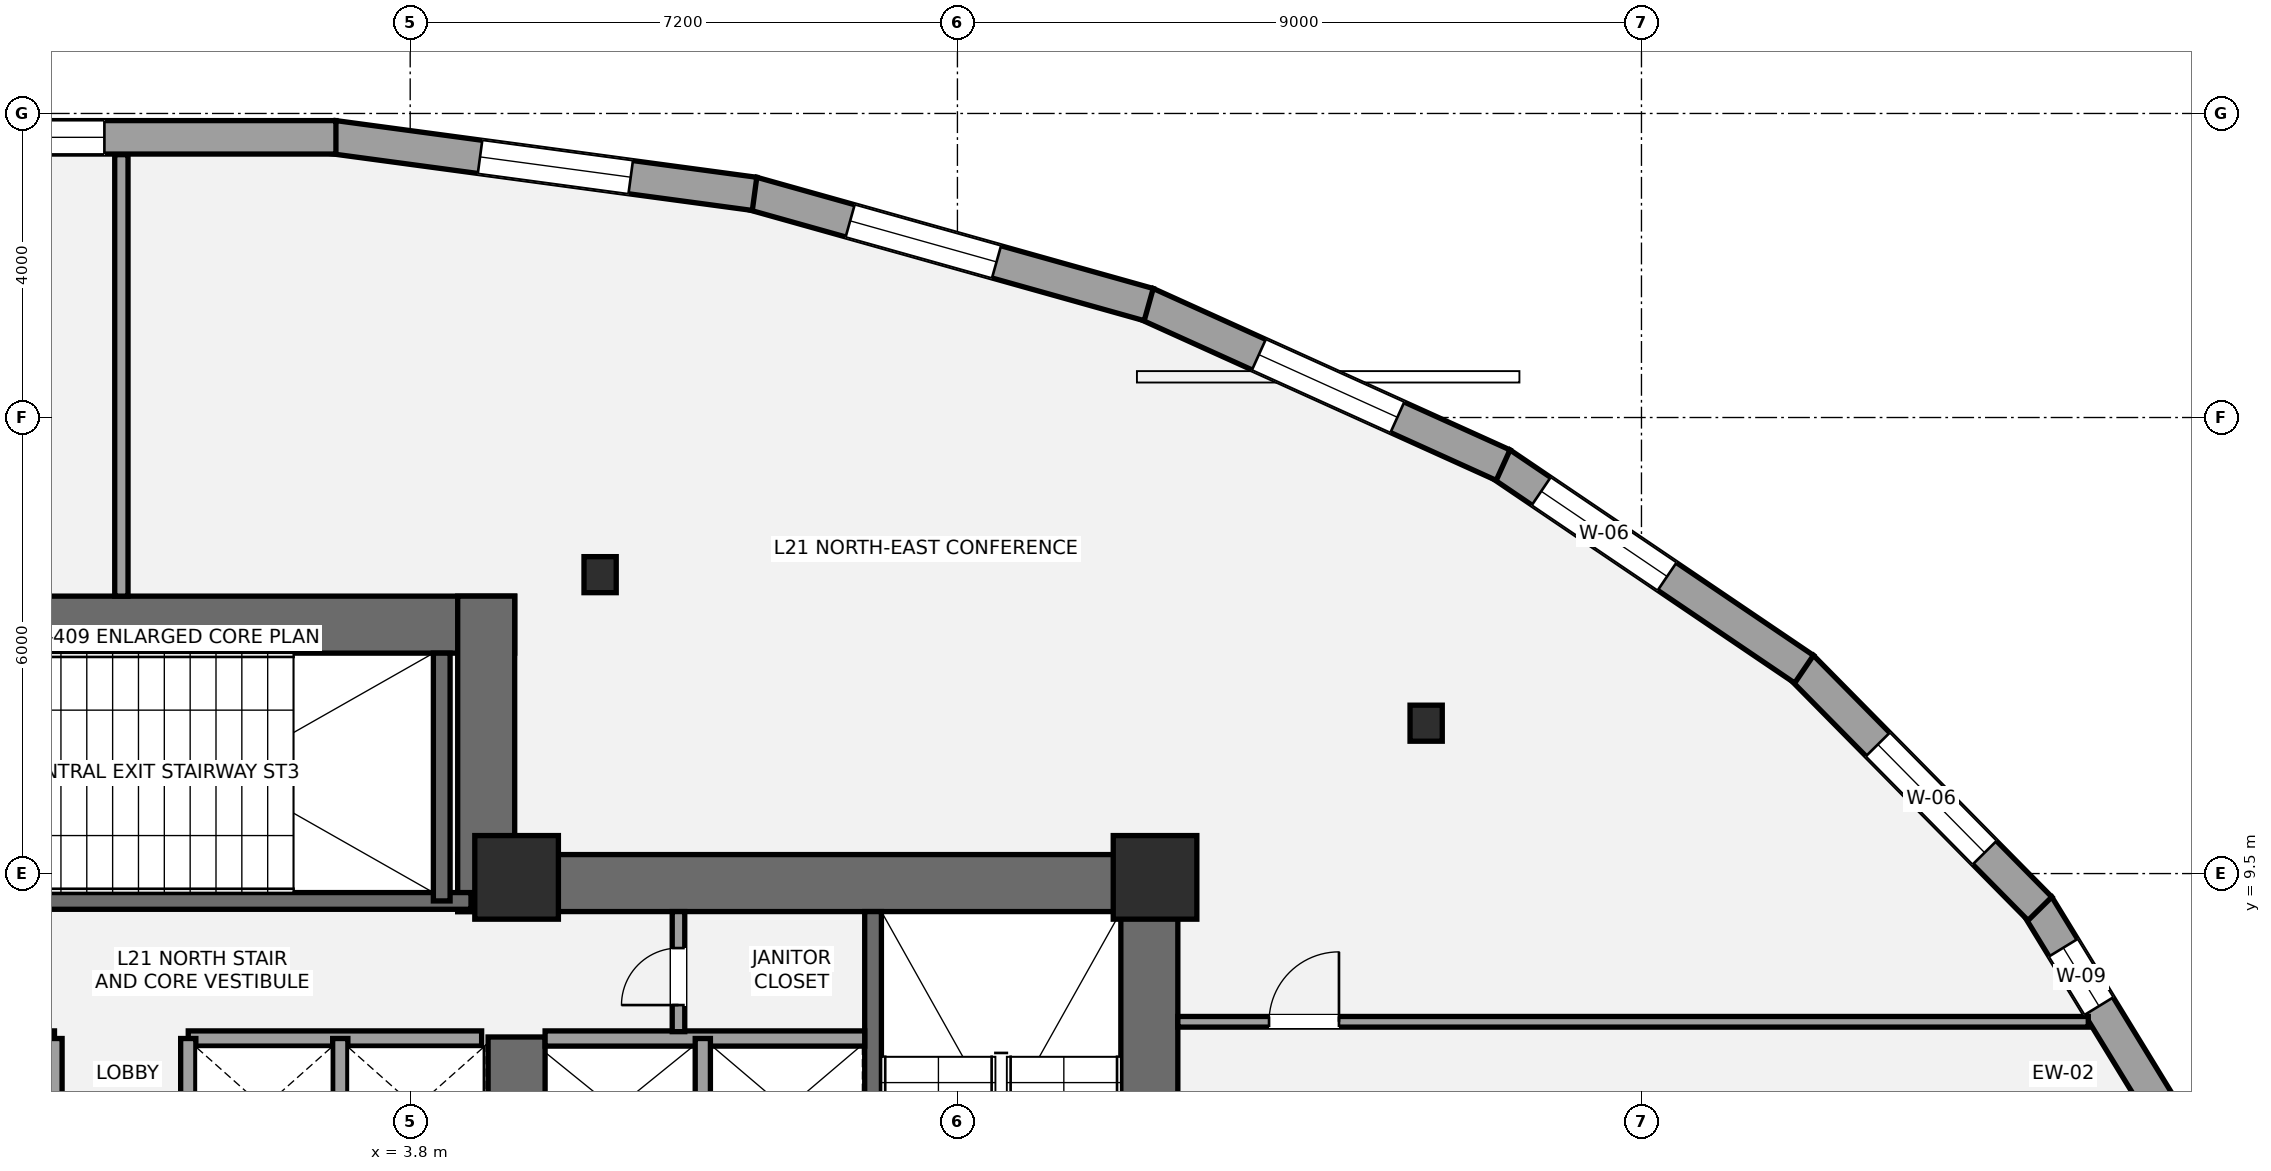
"""IFC4 building model, lengths in metres.
Left out: names, types, materials, properties, quantities, classifications, styles, units other than length and angle.
Written with IfcOpenShell. Run it as: python <this file> out.ifc"""

import sys

from ifc_helpers import new_model, si_unit, direction, frame, frame_2d, origin, origin_2d, place, context, subcontext, project, spatial, rectangle, i_section, extrude, element, fill, save


model = new_model("IFC4")
c1 = context("Model", 3, precision=1e-05, world=origin(), true_north=direction((0.0, 1.0)))
c2 = subcontext(c1, "Body", "Model", "MODEL_VIEW")
j1 = project(units=[si_unit("LENGTHUNIT", "METRE"), si_unit("PLANEANGLEUNIT", "RADIAN")], contexts=[c1])
p1 = place(None, origin())
s1 = spatial("IfcSite", under=j1, at=p1, CompositionType="ELEMENT")
p2 = place(p1, origin())
s2 = spatial("IfcBuilding", under=s1, at=p2, CompositionType="ELEMENT")
p3 = place(p2, frame((0.0, 0.0, 81.9)))
s3 = spatial("IfcBuildingStorey", under=s2, at=p3, CompositionType="ELEMENT", Elevation=81.9)
p4 = place(p3, frame((13.525, 1.1, 0.0), z_axis=(0.0, 0.0, 1.0), x_axis=(0.0, 1.0, 0.0)))
e1 = element("IfcWall", 1, at=p4, inside=s3, PredefinedType="SHEAR", context=c2, shape_type="SweptSolid", body=[
    extrude(rectangle(XDim=8.65, YDim=0.75, at=frame_2d((4.325, 0.0))), origin(), (0.0, 0.0, 1.0), 4.2),
])
p5 = place(p3, frame((4.425, 9.375, 0.0), z_axis=(0.0, 0.0, 1.0), x_axis=(1.0, 0.0, 0.0)))
e2 = element("IfcWall", 2, at=p5, inside=s3, PredefinedType="SHEAR", context=c2, shape_type="SweptSolid", body=[
    extrude(rectangle(XDim=9.475, YDim=0.75, at=frame_2d((4.737, 0.0))), origin(), (0.0, 0.0, 1.0), 4.2),
])
p6 = place(p3, frame((5.2, 5.35, 0.0), z_axis=(0.0, 0.0, 1.0), x_axis=(0.0, 1.0, 0.0)))
e3 = element("IfcWall", 3, at=p6, inside=s3, PredefinedType="SHEAR", context=c2, shape_type="SweptSolid", body=[
    extrude(rectangle(XDim=2.0, YDim=0.75, at=frame_2d((1.0, 0.0))), origin(), (0.0, 0.0, 1.0), 4.2),
])
p7 = place(p3, frame((9.89, 1.85, 0.0), z_axis=(0.0, 0.0, 1.0), x_axis=(0.0, 1.0, 0.0)))
e4 = element("IfcWall", 4, at=p7, inside=s3, PredefinedType="SHEAR", context=c2, shape_type="SweptSolid", body=[
    extrude(rectangle(XDim=7.15, YDim=0.22, at=frame_2d((3.575, 0.0))), origin(), (0.0, 0.0, 1.0), 4.2),
])
p8 = place(p3, frame((-5.175, 12.775, 0.0), z_axis=(0.0, 0.0, 1.0), x_axis=(1.0, 0.0, 0.0)))
e5 = element("IfcWall", 5, at=p8, inside=s3, PredefinedType="SHEAR", context=c2, shape_type="SweptSolid", body=[
    extrude(rectangle(XDim=10.35, YDim=0.75, at=frame_2d((5.175, 0.0))), origin(), (0.0, 0.0, 1.0), 4.2),
])
p9 = place(p3, frame((4.8, 9.0, 0.0), z_axis=(0.0, 0.0, 1.0), x_axis=(0.0, 1.0, 0.0)))
e6 = element("IfcWall", 6, at=p9, inside=s3, PredefinedType="SHEAR", context=c2, shape_type="SweptSolid", body=[
    extrude(rectangle(XDim=4.15, YDim=0.75, at=frame_2d((2.075, 0.0))), origin(), (0.0, 0.0, 1.0), 4.2),
])
p10 = place(p3, frame((-4.7, 9.14, 0.0), z_axis=(0.0, 0.0, 1.0), x_axis=(1.0, 0.0, 0.0)))
e7 = element("IfcWall", 7, at=p10, inside=s3, PredefinedType="SHEAR", context=c2, shape_type="SweptSolid", body=[
    extrude(rectangle(XDim=9.3, YDim=0.22, at=frame_2d((4.65, 0.0))), origin(), (0.0, 0.0, 1.0), 4.2),
])
p11 = place(p10, frame((1.15, 0.0, 0.0)))
e8 = element("IfcOpeningElement", 8, at=p11, cuts=e7, PredefinedType="OPENING", context=c2, shape_type="SweptSolid", body=[
    extrude(rectangle(XDim=1.05, YDim=2.15, at=frame_2d((0.525, 1.075))), frame((0.0, 0.12, 0.0), z_axis=(0.0, -1.0, 0.0), x_axis=(1.0, 0.0, 0.0)), (0.0, 0.0, 1.0), 0.24),
])
p12 = place(p3, frame((4.215, 9.14, 0.0), z_axis=(0.0, 0.0, 1.0), x_axis=(0.0, 1.0, 0.0)))
e9 = element("IfcWall", 9, at=p12, inside=s3, PredefinedType="SHEAR", context=c2, shape_type="SweptSolid", body=[
    extrude(rectangle(XDim=3.26, YDim=0.22, at=frame_2d((1.63, 0.0))), origin(), (0.0, 0.0, 1.0), 4.2),
])
for number, where, z_axis, x_axis in (
    (10, (5.2, 9.45, 0.0), (0.0, 0.0, 1.0), (1.0, 0.0, 0.0)),
    (11, (13.6, 9.45, 0.0), (0.0, 0.0, 1.0), (1.0, 0.0, 0.0)),
):
    element("IfcColumn", number, at=place(p3, frame(where, z_axis=z_axis, x_axis=x_axis)), inside=s3, PredefinedType="COLUMN", context=c2, shape_type="SweptSolid", body=[
        extrude(rectangle(XDim=1.1, YDim=1.1, at=origin_2d()), origin(), (0.0, 0.0, 1.0), 4.2),
    ])
for number, where, z_axis, x_axis in (
    (12, (17.167, 11.478, 0.0), (0.0, 0.0, 1.0), (1.0, 0.0, 0.0)),
    (13, (6.299, 13.433, 0.0), (0.0, 0.0, 1.0), (1.0, 0.0, 0.0)),
):
    element("IfcColumn", number, at=place(p3, frame(where, z_axis=z_axis, x_axis=x_axis)), inside=s3, PredefinedType="COLUMN", context=c2, shape_type="SweptSolid", body=[
        extrude(i_section(OverallWidth=0.424, OverallDepth=0.474, WebThickness=0.048, FlangeThickness=0.077, at=origin_2d()), origin(), (0.0, 0.0, 1.0), 4.2),
    ])
p13 = place(p3, frame((25.212, 9.077, 0.0), z_axis=(0.0, 0.0, 1.0), x_axis=(0.521891226532, -0.85301204427, 0.0)))
e14 = element("IfcWall", 14, at=p13, inside=s3, PredefinedType="STANDARD", context=c2, shape_type="SweptSolid", body=[
    extrude(rectangle(XDim=4.14, YDim=0.44, at=frame_2d((2.07, 0.0))), origin(), (0.0, 0.0, 1.0), 3.228),
])
p14 = place(p13, frame((0.648, 0.0, 0.58)))
e15 = element("IfcOpeningElement", 15, at=p14, cuts=e14, PredefinedType="OPENING", context=c2, shape_type="SweptSolid", body=[
    extrude(rectangle(XDim=0.9, YDim=1.35, at=frame_2d((0.45, 0.675))), frame((0.0, 0.23, 0.0), z_axis=(0.0, -1.0, 0.0), x_axis=(1.0, 0.0, 0.0)), (0.0, 0.0, 1.0), 0.46),
])
p15 = place(p3, frame((22.106, 12.216, 0.0), z_axis=(0.0, 0.0, 1.0), x_axis=(0.702361901729, -0.711820032733, 0.0)))
e16 = element("IfcWall", 16, at=p15, inside=s3, PredefinedType="STANDARD", context=c2, shape_type="SweptSolid", body=[
    extrude(rectangle(XDim=4.466, YDim=0.44, at=frame_2d((2.233, 0.0))), origin(), (0.0, 0.0, 1.0), 3.232),
])
p16 = place(p15, frame((1.429, 0.0, 0.6)))
e17 = element("IfcOpeningElement", 17, at=p16, cuts=e16, PredefinedType="OPENING", context=c2, shape_type="SweptSolid", body=[
    extrude(rectangle(XDim=2.0, YDim=2.1, at=frame_2d((1.0, 1.05))), frame((0.0, 0.23, 0.0), z_axis=(0.0, -1.0, 0.0), x_axis=(1.0, 0.0, 0.0)), (0.0, 0.0, 1.0), 0.46),
])
p17 = place(p3, frame((18.147, 14.892, 0.0), z_axis=(0.0, 0.0, 1.0), x_axis=(0.82804003003, -0.560668983151, 0.0)))
e18 = element("IfcWall", 18, at=p17, inside=s3, PredefinedType="STANDARD", context=c2, shape_type="SweptSolid", body=[
    extrude(rectangle(XDim=4.821, YDim=0.44, at=frame_2d((2.411, 0.0))), origin(), (0.0, 0.0, 1.0), 3.232),
])
p18 = place(p17, frame((0.645, 0.0, 0.6)))
e19 = element("IfcOpeningElement", 19, at=p18, cuts=e18, PredefinedType="OPENING", context=c2, shape_type="SweptSolid", body=[
    extrude(rectangle(XDim=2.0, YDim=2.1, at=frame_2d((1.0, 1.05))), frame((0.0, 0.23, 0.0), z_axis=(0.0, -1.0, 0.0), x_axis=(1.0, 0.0, 0.0)), (0.0, 0.0, 1.0), 0.46),
])
p19 = place(p3, frame((13.486, 16.997, 0.0), z_axis=(0.0, 0.0, 1.0), x_axis=(0.911088856004, -0.412210014999, 0.0)))
e20 = element("IfcWall", 20, at=p19, inside=s3, PredefinedType="STANDARD", context=c2, shape_type="SweptSolid", body=[
    extrude(rectangle(XDim=5.152, YDim=0.44, at=frame_2d((2.576, 0.0))), origin(), (0.0, 0.0, 1.0), 3.228),
])
p20 = place(p19, frame((1.625, 0.0, 0.6)))
e21 = element("IfcOpeningElement", 21, at=p20, cuts=e20, PredefinedType="OPENING", context=c2, shape_type="SweptSolid", body=[
    extrude(rectangle(XDim=2.0, YDim=2.1, at=frame_2d((1.0, 1.05))), frame((0.0, 0.23, 0.0), z_axis=(0.0, -1.0, 0.0), x_axis=(1.0, 0.0, 0.0)), (0.0, 0.0, 1.0), 0.46),
])
p21 = place(p3, frame((8.301, 18.448, 0.0), z_axis=(0.0, 0.0, 1.0), x_axis=(0.962849260033, -0.270039446109, 0.0)))
e22 = element("IfcWall", 22, at=p21, inside=s3, PredefinedType="STANDARD", context=c2, shape_type="SweptSolid", body=[
    extrude(rectangle(XDim=5.417, YDim=0.44, at=frame_2d((2.708, 0.0))), origin(), (0.0, 0.0, 1.0), 3.228),
])
p22 = place(p21, frame((1.338, 0.0, 0.6)))
e23 = element("IfcOpeningElement", 23, at=p22, cuts=e22, PredefinedType="OPENING", context=c2, shape_type="SweptSolid", body=[
    extrude(rectangle(XDim=2.0, YDim=2.1, at=frame_2d((1.0, 1.05))), frame((0.0, 0.23, 0.0), z_axis=(0.0, -1.0, 0.0), x_axis=(1.0, 0.0, 0.0)), (0.0, 0.0, 1.0), 0.46),
])
p23 = place(p3, frame((2.793, 19.188, 0.0), z_axis=(0.0, 0.0, 1.0), x_axis=(0.9910561058, -0.133445851026, 0.0)))
e24 = element("IfcWall", 24, at=p23, inside=s3, PredefinedType="STANDARD", context=c2, shape_type="SweptSolid", body=[
    extrude(rectangle(XDim=5.587, YDim=0.44, at=frame_2d((2.794, 0.0))), origin(), (0.0, 0.0, 1.0), 3.228),
])
p24 = place(p23, frame((1.943, 0.0, 0.6)))
e25 = element("IfcOpeningElement", 25, at=p24, cuts=e24, PredefinedType="OPENING", context=c2, shape_type="SweptSolid", body=[
    extrude(rectangle(XDim=2.0, YDim=2.1, at=frame_2d((1.0, 1.05))), frame((0.0, 0.23, 0.0), z_axis=(0.0, -1.0, 0.0), x_axis=(1.0, 0.0, 0.0)), (0.0, 0.0, 1.0), 0.46),
])
p25 = place(p3, frame((-2.823, 19.186, 0.0), z_axis=(0.0, 0.0, 1.0), x_axis=(1.0, 0.0, 0.0)))
e26 = element("IfcWall", 26, at=p25, inside=s3, PredefinedType="STANDARD", context=c2, shape_type="SweptSolid", body=[
    extrude(rectangle(XDim=5.646, YDim=0.44, at=frame_2d((2.823, 0.0))), origin(), (0.0, 0.0, 1.0), 3.232),
])
p26 = place(p25, frame((0.6, 0.0, 0.6)))
e27 = element("IfcOpeningElement", 27, at=p26, cuts=e26, PredefinedType="OPENING", context=c2, shape_type="SweptSolid", body=[
    extrude(rectangle(XDim=2.0, YDim=2.1, at=frame_2d((1.0, 1.05))), frame((0.0, 0.23, 0.0), z_axis=(0.0, -1.0, 0.0), x_axis=(1.0, 0.0, 0.0)), (0.0, 0.0, 1.0), 0.46),
])
p27 = place(p3, frame((5.575, 7.33, 0.0), z_axis=(0.0, 0.0, 1.0), x_axis=(1.0, 0.0, 0.0)))
e28 = element("IfcWall", 28, at=p27, inside=s3, PredefinedType="SOLIDWALL", context=c2, shape_type="SweptSolid", body=[
    extrude(rectangle(XDim=4.205, YDim=0.2, at=frame_2d((2.103, 0.0))), origin(), (0.0, 0.0, 1.0), 4.01),
])
p28 = place(p3, frame((7.65, 5.47, 0.0), z_axis=(0.0, 0.0, 1.0), x_axis=(0.0, 1.0, 0.0)))
e29 = element("IfcWall", 29, at=p28, inside=s3, PredefinedType="SOLIDWALL", context=c2, shape_type="SweptSolid", body=[
    extrude(rectangle(XDim=1.86, YDim=0.2, at=frame_2d((0.93, 0.0))), origin(), (0.0, 0.0, 1.0), 4.01),
])
for number, where, z_axis, x_axis in (
    (30, (-4.74, 7.33, 0.0), (0.0, 0.0, 1.0), (1.0, 0.0, 0.0)),
    (31, (0.88, 7.33, 0.0), (0.0, 0.0, 1.0), (1.0, 0.0, 0.0)),
):
    element("IfcWall", number, at=place(p3, frame(where, z_axis=z_axis, x_axis=x_axis)), inside=s3, PredefinedType="SOLIDWALL", context=c2, shape_type="SweptSolid", body=[
        extrude(rectangle(XDim=3.86, YDim=0.2, at=frame_2d((1.93, 0.0))), origin(), (0.0, 0.0, 1.0), 4.01),
    ])
for number, where, z_axis, x_axis in (
    (32, (2.88, 5.52, 0.0), (0.0, 0.0, 1.0), (0.0, 1.0, 0.0)),
    (33, (-0.88, 5.52, 0.0), (0.0, 0.0, 1.0), (0.0, 1.0, 0.0)),
    (34, (0.88, 5.52, 0.0), (0.0, 0.0, 1.0), (0.0, 1.0, 0.0)),
):
    element("IfcWall", number, at=place(p3, frame(where, z_axis=z_axis, x_axis=x_axis)), inside=s3, PredefinedType="SOLIDWALL", context=c2, shape_type="SweptSolid", body=[
        extrude(rectangle(XDim=1.81, YDim=0.2, at=frame_2d((0.905, 0.0))), origin(), (0.0, 0.0, 1.0), 4.01),
    ])
p29 = place(p3, frame((7.33, 7.42, 0.0), z_axis=(0.0, 0.0, 1.0), x_axis=(0.0, 1.0, 0.0)))
e35 = element("IfcWall", 35, at=p29, inside=s3, PredefinedType="PARTITIONING", context=c2, shape_type="SweptSolid", body=[
    extrude(rectangle(XDim=1.58, YDim=0.165, at=frame_2d((0.79, 0.0))), origin(), (0.0, 0.0, 1.0), 4.01),
])
p30 = place(p29, frame((0.35, 0.0, 0.0)))
e36 = element("IfcOpeningElement", 36, at=p30, cuts=e35, PredefinedType="OPENING", context=c2, shape_type="SweptSolid", body=[
    extrude(rectangle(XDim=0.75, YDim=2.1, at=frame_2d((0.375, 1.05))), frame((0.0, 0.093, 0.0), z_axis=(0.0, -1.0, 0.0), x_axis=(1.0, 0.0, 0.0)), (0.0, 0.0, 1.0), 0.185),
])
p31 = place(p3, frame((13.9, 7.55, 0.0), z_axis=(0.0, 0.0, 1.0), x_axis=(1.0, 0.0, 0.0)))
e37 = element("IfcWall", 37, at=p31, inside=s3, PredefinedType="PARTITIONING", context=c2, shape_type="SweptSolid", body=[
    extrude(rectangle(XDim=11.979, YDim=0.14, at=frame_2d((5.99, 0.0))), origin(), (0.0, 0.0, 1.0), 3.463),
])
p32 = place(p31, frame((1.2, 0.0, 0.0)))
e38 = element("IfcOpeningElement", 38, at=p32, cuts=e37, PredefinedType="OPENING", context=c2, shape_type="SweptSolid", body=[
    extrude(rectangle(XDim=0.92, YDim=2.15, at=frame_2d((0.46, 1.075))), frame((0.0, 0.08, 0.0), z_axis=(0.0, -1.0, 0.0), x_axis=(1.0, 0.0, 0.0)), (0.0, 0.0, 1.0), 0.16),
])
p33 = place(p3, frame((0.0, 13.15, 0.0), z_axis=(0.0, 0.0, 1.0), x_axis=(0.0, 1.0, 0.0)))
e39 = element("IfcWall", 39, at=p33, inside=s3, PredefinedType="PARTITIONING", context=c2, shape_type="SweptSolid", body=[
    extrude(rectangle(XDim=5.808, YDim=0.175, at=frame_2d((2.904, 0.0))), origin(), (0.0, 0.0, 1.0), 3.463),
])
p34 = place(p14, origin())
e40 = element("IfcWindow", 40, at=p34, inside=s3, PartitioningType="SINGLE_PANEL", PredefinedType="WINDOW", context=c2, shape_type="SweptSolid", body=[
    extrude(rectangle(XDim=0.9, YDim=1.35, at=frame_2d((0.45, 0.675))), frame((0.0, -0.01, 0.0), z_axis=(0.0, -1.0, 0.0), x_axis=(1.0, 0.0, 0.0)), (0.0, 0.0, 1.0), 0.06),
])
fill(e15, e40)
p35 = place(p16, origin())
e41 = element("IfcWindow", 41, at=p35, inside=s3, PartitioningType="SINGLE_PANEL", PredefinedType="WINDOW", context=c2, shape_type="SweptSolid", body=[
    extrude(rectangle(XDim=2.0, YDim=2.1, at=frame_2d((1.0, 1.05))), frame((0.0, -0.01, 0.0), z_axis=(0.0, -1.0, 0.0), x_axis=(1.0, 0.0, 0.0)), (0.0, 0.0, 1.0), 0.06),
])
fill(e17, e41)
p36 = place(p18, origin())
e42 = element("IfcWindow", 42, at=p36, inside=s3, PartitioningType="SINGLE_PANEL", PredefinedType="WINDOW", context=c2, shape_type="SweptSolid", body=[
    extrude(rectangle(XDim=2.0, YDim=2.1, at=frame_2d((1.0, 1.05))), frame((0.0, -0.01, 0.0), z_axis=(0.0, -1.0, 0.0), x_axis=(1.0, 0.0, 0.0)), (0.0, 0.0, 1.0), 0.06),
])
fill(e19, e42)
p37 = place(p20, origin())
e43 = element("IfcWindow", 43, at=p37, inside=s3, PartitioningType="SINGLE_PANEL", PredefinedType="WINDOW", context=c2, shape_type="SweptSolid", body=[
    extrude(rectangle(XDim=2.0, YDim=2.1, at=frame_2d((1.0, 1.05))), frame((0.0, -0.01, 0.0), z_axis=(0.0, -1.0, 0.0), x_axis=(1.0, 0.0, 0.0)), (0.0, 0.0, 1.0), 0.06),
])
fill(e21, e43)
p38 = place(p22, origin())
e44 = element("IfcWindow", 44, at=p38, inside=s3, PartitioningType="SINGLE_PANEL", PredefinedType="WINDOW", context=c2, shape_type="SweptSolid", body=[
    extrude(rectangle(XDim=2.0, YDim=2.1, at=frame_2d((1.0, 1.05))), frame((0.0, -0.01, 0.0), z_axis=(0.0, -1.0, 0.0), x_axis=(1.0, 0.0, 0.0)), (0.0, 0.0, 1.0), 0.06),
])
fill(e23, e44)
p39 = place(p24, origin())
e45 = element("IfcWindow", 45, at=p39, inside=s3, PartitioningType="SINGLE_PANEL", PredefinedType="WINDOW", context=c2, shape_type="SweptSolid", body=[
    extrude(rectangle(XDim=2.0, YDim=2.1, at=frame_2d((1.0, 1.05))), frame((0.0, -0.01, 0.0), z_axis=(0.0, -1.0, 0.0), x_axis=(1.0, 0.0, 0.0)), (0.0, 0.0, 1.0), 0.06),
])
fill(e25, e45)
p40 = place(p26, origin())
e46 = element("IfcWindow", 46, at=p40, inside=s3, PartitioningType="SINGLE_PANEL", PredefinedType="WINDOW", context=c2, shape_type="SweptSolid", body=[
    extrude(rectangle(XDim=2.0, YDim=2.1, at=frame_2d((1.0, 1.05))), frame((0.0, -0.01, 0.0), z_axis=(0.0, -1.0, 0.0), x_axis=(1.0, 0.0, 0.0)), (0.0, 0.0, 1.0), 0.06),
])
fill(e27, e46)
p41 = place(p30, origin())
e47 = element("IfcDoor", 47, at=p41, inside=s3, OperationType="SINGLE_SWING_LEFT", PredefinedType="DOOR", context=c2, shape_type="SweptSolid", body=[
    extrude(rectangle(XDim=0.75, YDim=2.1, at=frame_2d((0.375, 1.05))), frame((0.0, 0.025, 0.0), z_axis=(0.0, -1.0, 0.0), x_axis=(1.0, 0.0, 0.0)), (0.0, 0.0, 1.0), 0.05),
])
fill(e36, e47)
p42 = place(p32, origin())
e48 = element("IfcDoor", 48, at=p42, inside=s3, OperationType="SINGLE_SWING_RIGHT", PredefinedType="DOOR", context=c2, shape_type="SweptSolid", body=[
    extrude(rectangle(XDim=0.92, YDim=2.15, at=frame_2d((0.46, 1.075))), frame((0.0, 0.025, 0.0), z_axis=(0.0, -1.0, 0.0), x_axis=(1.0, 0.0, 0.0)), (0.0, 0.0, 1.0), 0.05),
])
fill(e38, e48)
save(model, sys.argv[1])
